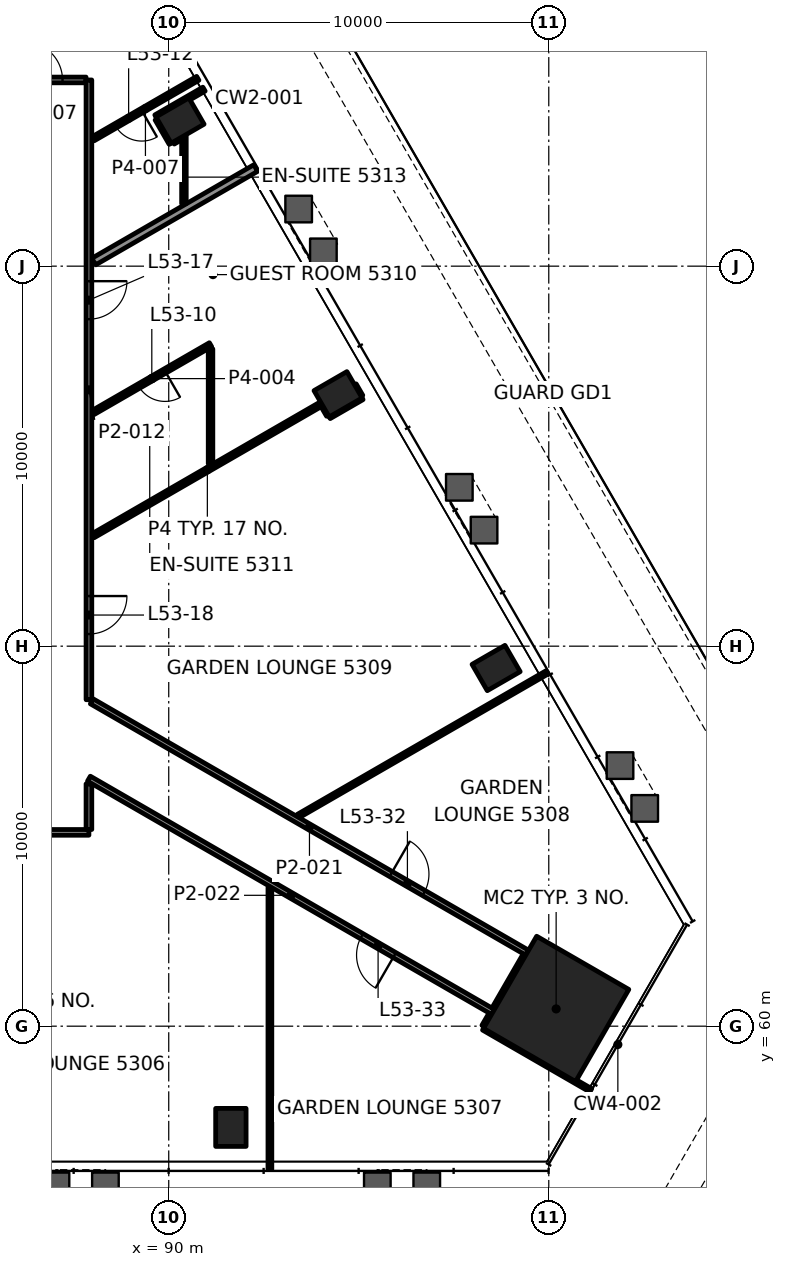
"""IFC4 building model, lengths in metres.
Left out: names, types, materials, properties, quantities, classifications, styles, units other than length and angle.
Written with IfcOpenShell. Run it as: python <this file> out.ifc"""

import sys

from ifc_helpers import new_model, si_unit, direction, frame, frame_2d, origin, origin_2d, place, context, subcontext, project, spatial, rectangle, hollow_rectangle, extrude, element, fill, save


model = new_model("IFC4")
c1 = context("Model", 3, precision=1e-05, world=origin(), true_north=direction((0.0, 1.0)))
c2 = subcontext(c1, "Body", "Model", "MODEL_VIEW")
j1 = project(units=[si_unit("LENGTHUNIT", "METRE"), si_unit("PLANEANGLEUNIT", "RADIAN")], contexts=[c1])
p1 = place(None, origin())
s1 = spatial("IfcSite", under=j1, at=p1, CompositionType="ELEMENT")
p2 = place(p1, origin())
s2 = spatial("IfcBuilding", under=s1, at=p2, CompositionType="ELEMENT")
p3 = place(p2, frame((0.0, 0.0, 226.0)))
s3 = spatial("IfcBuildingStorey", under=s2, at=p3, CompositionType="ELEMENT", Elevation=226.0)
p4 = place(p3, frame((100.194, 60.454, 0.0), z_axis=(0.0, 0.0, 1.0), x_axis=(0.5, 0.866025403784, 0.0)))
e1 = element("IfcColumn", 1, at=p4, inside=s3, PredefinedType="COLUMN", context=c2, shape_type="SweptSolid", body=[
    extrude(rectangle(XDim=2.8, YDim=2.8, at=origin_2d()), origin(), (0.0, 0.0, 1.0), 3.9),
])
for number, where, z_axis, x_axis in (
    (2, (91.635, 57.337, -0.0), (0.0, 0.0, 1.0), (1.0, 0.0, 0.0)),
    (3, (98.615, 69.425, -0.0), (0.0, 0.0, 1.0), (-0.5, 0.866, 0.0)),
    (4, (94.456, 76.628, -0.0), (0.0, 0.0, 1.0), (-0.5, 0.866, 0.0)),
    (5, (90.297, 83.832, -0.0), (0.0, 0.0, 1.0), (-0.5, 0.866, 0.0)),
):
    element("IfcColumn", number, at=place(p3, frame(where, z_axis=z_axis, x_axis=x_axis)), inside=s3, PredefinedType="COLUMN", context=c2, shape_type="SweptSolid", body=[
        extrude(hollow_rectangle(XDim=0.8, YDim=1.0, WallThickness=0.05, at=origin_2d()), origin(), (0.0, 0.0, 1.0), 3.9),
    ])
p5 = place(p3, frame((87.899, 65.1, 0.0), z_axis=(0.0, 0.0, 1.0), x_axis=(-1.0, 0.0, 0.0)))
e6 = element("IfcWall", 6, at=p5, inside=s3, PredefinedType="PARTITIONING", context=c2, shape_type="SweptSolid", body=[
    extrude(rectangle(XDim=25.799, YDim=0.15, at=frame_2d((12.899, 0.0))), origin(), (0.0, 0.0, 1.0), 3.1),
])
p6 = place(p5, frame((1.636, 0.0, 0.0)))
e7 = element("IfcOpeningElement", 7, at=p6, cuts=e6, PredefinedType="OPENING", context=c2, shape_type="SweptSolid", body=[
    extrude(rectangle(XDim=1.0, YDim=2.1, at=frame_2d((0.5, 1.05))), frame((0.0, 0.085, 0.0), z_axis=(0.0, -1.0, 0.0), x_axis=(1.0, 0.0, 0.0)), (0.0, 0.0, 1.0), 0.17),
])
p7 = place(p5, frame((7.984, 0.0, 0.0)))
e8 = element("IfcOpeningElement", 8, at=p7, cuts=e6, PredefinedType="OPENING", context=c2, shape_type="SweptSolid", body=[
    extrude(rectangle(XDim=1.0, YDim=2.1, at=frame_2d((0.5, 1.05))), frame((0.0, 0.085, 0.0), z_axis=(0.0, -1.0, 0.0), x_axis=(1.0, 0.0, 0.0)), (0.0, 0.0, 1.0), 0.17),
])
p8 = place(p5, frame((16.815, 0.0, 0.0)))
e9 = element("IfcOpeningElement", 9, at=p8, cuts=e6, PredefinedType="OPENING", context=c2, shape_type="SweptSolid", body=[
    extrude(rectangle(XDim=1.0, YDim=2.1, at=frame_2d((0.5, 1.05))), frame((0.0, 0.085, 0.0), z_axis=(0.0, -1.0, 0.0), x_axis=(1.0, 0.0, 0.0)), (0.0, 0.0, 1.0), 0.17),
])
p9 = place(p5, frame((23.163, 0.0, 0.0)))
e10 = element("IfcOpeningElement", 10, at=p9, cuts=e6, PredefinedType="OPENING", context=c2, shape_type="SweptSolid", body=[
    extrude(rectangle(XDim=1.0, YDim=2.1, at=frame_2d((0.5, 1.05))), frame((0.0, 0.085, 0.0), z_axis=(0.0, -1.0, 0.0), x_axis=(1.0, 0.0, 0.0)), (0.0, 0.0, 1.0), 0.17),
])
p10 = place(p3, frame((78.215, 84.9, 0.0), z_axis=(0.0, 0.0, 1.0), x_axis=(1.0, 0.0, 0.0)))
e11 = element("IfcWall", 11, at=p10, inside=s3, PredefinedType="PARTITIONING", context=c2, shape_type="SweptSolid", body=[
    extrude(rectangle(XDim=9.609, YDim=0.15, at=frame_2d((4.805, 0.0))), origin(), (0.0, 0.0, 1.0), 3.097),
])
p11 = place(p10, frame((7.99, 0.0, 0.0)))
e12 = element("IfcOpeningElement", 12, at=p11, cuts=e11, PredefinedType="OPENING", context=c2, shape_type="SweptSolid", body=[
    extrude(rectangle(XDim=1.0, YDim=2.1, at=frame_2d((0.5, 1.05))), frame((0.0, 0.085, 0.0), z_axis=(0.0, -1.0, 0.0), x_axis=(1.0, 0.0, 0.0)), (0.0, 0.0, 1.0), 0.17),
])
p12 = place(p3, frame((93.406, 65.529, 0.0), z_axis=(0.0, 0.0, 1.0), x_axis=(0.866032295486, 0.499988063033, 0.0)))
e13 = element("IfcWall", 13, at=p12, inside=s3, PredefinedType="PARTITIONING", context=c2, shape_type="SweptSolid", body=[
    extrude(rectangle(XDim=7.559, YDim=0.1, at=frame_2d((3.779, 0.0))), origin(), (0.0, 0.0, 1.0), 3.1),
])
p13 = place(p3, frame((94.223, 76.032, 0.0), z_axis=(0.0, 0.0, 1.0), x_axis=(0.86597798544, 0.50008212199, 0.0)))
e14 = element("IfcWall", 14, at=p13, inside=s3, PredefinedType="PARTITIONING", context=c2, shape_type="SweptSolid", body=[
    extrude(rectangle(XDim=0.999, YDim=0.1, at=frame_2d((0.5, 0.0))), origin(), (0.0, 0.0, 1.0), 3.022),
])
p14 = place(p3, frame((88.01, 72.906, 0.0), z_axis=(0.0, 0.0, 1.0), x_axis=(0.866025136247, 0.500000463387, 0.0)))
e15 = element("IfcWall", 15, at=p14, inside=s3, PredefinedType="PARTITIONING", context=c2, shape_type="SweptSolid", body=[
    extrude(rectangle(XDim=6.943, YDim=0.12, at=frame_2d((3.471, 0.0))), origin(), (0.0, 0.0, 1.0), 3.1),
])
p15 = place(p3, frame((91.1, 77.933, 0.0), z_axis=(0.0, 0.0, 1.0), x_axis=(-0.866045460162, -0.499965259726, 0.0)))
e16 = element("IfcWall", 16, at=p15, inside=s3, PredefinedType="PARTITIONING", context=c2, shape_type="SweptSolid", body=[
    extrude(rectangle(XDim=3.569, YDim=0.12, at=frame_2d((1.784, 0.0))), origin(), (0.0, 0.0, 1.0), 3.1),
])
p16 = place(p15, frame((1.384, 0.0, 0.0)))
e17 = element("IfcOpeningElement", 17, at=p16, cuts=e16, PredefinedType="OPENING", context=c2, shape_type="SweptSolid", body=[
    extrude(rectangle(XDim=0.8, YDim=2.1, at=frame_2d((0.4, 1.05))), frame((0.0, 0.07, 0.0), z_axis=(0.0, -1.0, 0.0), x_axis=(1.0, 0.0, 0.0)), (0.0, 0.0, 1.0), 0.14),
])
p17 = place(p3, frame((88.027, 80.12, 0.0), z_axis=(0.0, 0.0, 1.0), x_axis=(0.866024509183, 0.500001549491, 0.0)))
e18 = element("IfcWall", 18, at=p17, inside=s3, PredefinedType="PARTITIONING", context=c2, shape_type="SweptSolid", body=[
    extrude(rectangle(XDim=4.922, YDim=0.2, at=frame_2d((2.461, 0.0))), origin(), (0.0, 0.0, 1.0), 3.022),
])
p18 = place(p3, frame((90.116, 83.265, 0.0), z_axis=(0.0, 0.0, 1.0), x_axis=(0.866036909293, 0.499980071345, 0.0)))
e19 = element("IfcWall", 19, at=p18, inside=s3, PredefinedType="PARTITIONING", context=c2, shape_type="SweptSolid", body=[
    extrude(rectangle(XDim=0.219, YDim=0.12, at=frame_2d((0.109, 0.0))), origin(), (0.0, 0.0, 1.0), 3.1),
])
p19 = place(p3, frame((89.664, 83.928, 0.0), z_axis=(0.0, 0.0, 1.0), x_axis=(0.866032430508, 0.49998782916, 0.0)))
e20 = element("IfcWall", 20, at=p19, inside=s3, PredefinedType="PARTITIONING", context=c2, shape_type="SweptSolid", body=[
    extrude(rectangle(XDim=1.46, YDim=0.12, at=frame_2d((0.73, 0.0))), origin(), (0.0, 0.0, 1.0), 3.022),
])
p20 = place(p3, frame((90.764, 84.942, 0.0), z_axis=(0.0, 0.0, 1.0), x_axis=(-0.866052668871, -0.499952772512, 0.0)))
e21 = element("IfcWall", 21, at=p20, inside=s3, PredefinedType="PARTITIONING", context=c2, shape_type="SweptSolid", body=[
    extrude(rectangle(XDim=3.181, YDim=0.12, at=frame_2d((1.59, 0.0))), origin(), (0.0, 0.0, 1.0), 3.022),
])
p21 = place(p20, frame((1.701, 0.0, 0.0)))
e22 = element("IfcOpeningElement", 22, at=p21, cuts=e21, PredefinedType="OPENING", context=c2, shape_type="SweptSolid", body=[
    extrude(rectangle(XDim=0.8, YDim=2.1, at=frame_2d((0.4, 1.05))), frame((0.0, 0.07, 0.0), z_axis=(0.0, -1.0, 0.0), x_axis=(1.0, 0.0, 0.0)), (0.0, 0.0, 1.0), 0.14),
])
p22 = place(p3, frame((84.115, 85.065, 0.0), z_axis=(0.0, 0.0, 1.0), x_axis=(0.866027152591, 0.499996970966, 0.0)))
e23 = element("IfcWall", 23, at=p22, inside=s3, PredefinedType="PARTITIONING", context=c2, shape_type="SweptSolid", body=[
    extrude(rectangle(XDim=5.697, YDim=0.2, at=frame_2d((2.848, 0.0))), origin(), (0.0, 0.0, 1.0), 3.022),
])
p23 = place(p3, frame((98.306, 59.986, 0.0), z_axis=(0.0, 0.0, 1.0), x_axis=(0.500136362069, 0.865946660792, 0.0)))
e24 = element("IfcWall", 24, at=p23, inside=s3, PredefinedType="PARTITIONING", context=c2, shape_type="SweptSolid", body=[
    extrude(rectangle(XDim=0.375, YDim=0.15, at=frame_2d((0.187, 0.0))), origin(), (0.0, 0.0, 1.0), 3.1),
])
p24 = place(p3, frame((92.662, 56.237, 0.0), z_axis=(0.0, 0.0, 1.0), x_axis=(0.0, 1.0, 0.0)))
e25 = element("IfcWall", 25, at=p24, inside=s3, PredefinedType="PARTITIONING", context=c2, shape_type="SweptSolid", body=[
    extrude(rectangle(XDim=7.41, YDim=0.1, at=frame_2d((3.705, 0.0))), origin(), (0.0, 0.0, 1.0), 3.1),
])
p25 = place(p3, frame((91.1, 74.8, 0.0), z_axis=(0.0, 0.0, 1.0), x_axis=(0.0, 1.0, 0.0)))
e26 = element("IfcWall", 26, at=p25, inside=s3, PredefinedType="PARTITIONING", context=c2, shape_type="SweptSolid", body=[
    extrude(rectangle(XDim=3.023, YDim=0.12, at=frame_2d((1.511, 0.0))), origin(), (0.0, 0.0, 1.0), 3.1),
])
p26 = place(p3, frame((90.4, 81.646, 0.0), z_axis=(0.0, 0.0, 1.0), x_axis=(0.0, 1.0, 0.0)))
e27 = element("IfcWall", 27, at=p26, inside=s3, PredefinedType="PARTITIONING", context=c2, shape_type="SweptSolid", body=[
    extrude(rectangle(XDim=1.784, YDim=0.12, at=frame_2d((0.892, 0.0))), origin(), (0.0, 0.0, 1.0), 3.022),
])
p27 = place(p3, frame((87.9, 65.176, 0.0), z_axis=(0.0, 0.0, 1.0), x_axis=(0.0, 1.0, 0.0)))
e28 = element("IfcWall", 28, at=p27, inside=s3, PredefinedType="PARTITIONING", context=c2, shape_type="SweptSolid", body=[
    extrude(rectangle(XDim=1.201, YDim=0.15, at=frame_2d((0.6, 0.0))), origin(), (0.0, 0.0, 1.0), 2.947),
])
p28 = place(p3, frame((87.9, 84.899, 0.0), z_axis=(0.0, 0.0, 1.0), x_axis=(0.0, -1.0, 0.0)))
e29 = element("IfcWall", 29, at=p28, inside=s3, PredefinedType="PARTITIONING", context=c2, shape_type="SweptSolid", body=[
    extrude(rectangle(XDim=16.308, YDim=0.15, at=frame_2d((8.154, 0.0))), origin(), (0.0, 0.0, 1.0), 3.1),
])
p29 = place(p28, frame((5.294, 0.0, 0.0)))
e30 = element("IfcOpeningElement", 30, at=p29, cuts=e29, PredefinedType="OPENING", context=c2, shape_type="SweptSolid", body=[
    extrude(rectangle(XDim=1.0, YDim=2.1, at=frame_2d((0.5, 1.05))), frame((0.0, 0.085, 0.0), z_axis=(0.0, -1.0, 0.0), x_axis=(1.0, 0.0, 0.0)), (0.0, 0.0, 1.0), 0.17),
])
p30 = place(p28, frame((13.58, 0.0, 0.0)))
e31 = element("IfcOpeningElement", 31, at=p30, cuts=e29, PredefinedType="OPENING", context=c2, shape_type="SweptSolid", body=[
    extrude(rectangle(XDim=1.0, YDim=2.1, at=frame_2d((0.5, 1.05))), frame((0.0, 0.085, 0.0), z_axis=(0.0, -1.0, 0.0), x_axis=(1.0, 0.0, 0.0)), (0.0, 0.0, 1.0), 0.17),
])
p31 = place(p3, frame((95.063, 76.576, 0.0), z_axis=(0.0, 0.0, 1.0), x_axis=(-0.500126092966, 0.865952591736, 0.0)))
e32 = element("IfcWall", 32, at=p31, inside=s3, PredefinedType="PARTITIONING", context=c2, shape_type="SweptSolid", body=[
    extrude(rectangle(XDim=0.349, YDim=0.1, at=frame_2d((0.175, 0.0))), origin(), (0.0, 0.0, 1.0), 3.1),
])
p32 = place(p3, frame((94.197, 76.076, 0.0), z_axis=(0.0, 0.0, 1.0), x_axis=(-0.500136839105, 0.865946385275, 0.0)))
e33 = element("IfcWall", 33, at=p32, inside=s3, PredefinedType="PARTITIONING", context=c2, shape_type="SweptSolid", body=[
    extrude(rectangle(XDim=0.289, YDim=0.1, at=frame_2d((0.145, 0.0))), origin(), (0.0, 0.0, 1.0), 3.1),
])
p33 = place(p3, frame((90.064, 83.235, 0.0), z_axis=(0.0, 0.0, 1.0), x_axis=(-0.500112705049, 0.865960323715, 0.0)))
e34 = element("IfcWall", 34, at=p33, inside=s3, PredefinedType="PARTITIONING", context=c2, shape_type="SweptSolid", body=[
    extrude(rectangle(XDim=0.74, YDim=0.12, at=frame_2d((0.37, 0.0))), origin(), (0.0, 0.0, 1.0), 3.1),
])
p34 = place(p3, frame((87.975, 68.548, 0.0), z_axis=(0.0, 0.0, 1.0), x_axis=(0.866030071145, -0.499991915808, 0.0)))
e35 = element("IfcWall", 35, at=p34, inside=s3, PredefinedType="PARTITIONING", context=c2, shape_type="SweptSolid", body=[
    extrude(rectangle(XDim=13.228, YDim=0.15, at=frame_2d((6.614, 0.0))), origin(), (0.0, 0.0, 1.0), 3.1),
])
p35 = place(p34, frame((9.09, 0.0, 0.0)))
e36 = element("IfcOpeningElement", 36, at=p35, cuts=e35, PredefinedType="OPENING", context=c2, shape_type="SweptSolid", body=[
    extrude(rectangle(XDim=1.0, YDim=2.1, at=frame_2d((0.5, 1.05))), frame((0.0, 0.085, 0.0), z_axis=(0.0, -1.0, 0.0), x_axis=(1.0, 0.0, 0.0)), (0.0, 0.0, 1.0), 0.17),
])
p36 = place(p3, frame((98.531, 60.375, 0.0), z_axis=(0.0, 0.0, 1.0), x_axis=(-0.866027942666, 0.499995602502, 0.0)))
e37 = element("IfcWall", 37, at=p36, inside=s3, PredefinedType="PARTITIONING", context=c2, shape_type="SweptSolid", body=[
    extrude(rectangle(XDim=12.276, YDim=0.15, at=frame_2d((6.138, 0.0))), origin(), (0.0, 0.0, 1.0), 2.947),
])
p37 = place(p36, frame((2.99, 0.0, 0.0)))
e38 = element("IfcOpeningElement", 38, at=p37, cuts=e37, PredefinedType="OPENING", context=c2, shape_type="SweptSolid", body=[
    extrude(rectangle(XDim=1.0, YDim=2.1, at=frame_2d((0.5, 1.05))), frame((0.0, 0.085, 0.0), z_axis=(0.0, -1.0, 0.0), x_axis=(1.0, 0.0, 0.0)), (0.0, 0.0, 1.0), 0.17),
])
p38 = place(p3, frame((101.105, 58.312, 0.0), z_axis=(0.0, 0.0, 1.0), x_axis=(-0.866035906198, 0.499981808845, 0.0)))
e39 = element("IfcWall", 39, at=p38, inside=s3, PredefinedType="PARTITIONING", context=c2, shape_type="SweptSolid", body=[
    extrude(rectangle(XDim=3.259, YDim=0.1, at=frame_2d((1.63, 0.0))), origin(), (0.0, 0.0, 1.0), 3.1),
])
p39 = place(p3, frame((98.569, 60.44, 0.0), z_axis=(0.0, 0.0, 1.0), x_axis=(0.500055614084, 0.865993292597, 0.0)))
e40 = element("IfcWall", 40, at=p39, inside=s3, PredefinedType="PARTITIONING", context=c2, shape_type="SweptSolid", body=[
    extrude(rectangle(XDim=1.649, YDim=0.15, at=frame_2d((0.825, 0.0))), origin(), (0.0, 0.0, 1.0), 2.947),
])
p40 = place(p3, frame((102.236, 53.491, 0.0), z_axis=(0.0, 0.0, 1.0), x_axis=(0.50001002959, 0.86601961312, 0.0)))
e41 = element("IfcWall", 41, at=p40, inside=s3, PredefinedType="SOLIDWALL", context=c2, shape_type="SweptSolid", body=[
    extrude(rectangle(XDim=10.019, YDim=0.8, at=frame_2d((5.009, 0.0))), origin(), (0.0, 0.0, 1.0), 0.9),
])
p41 = place(p3, frame((107.245, 63.176, 0.0), z_axis=(0.0, 0.0, 1.0), x_axis=(-0.500002275173, 0.866024090209, 0.0)))
e42 = element("IfcWall", 42, at=p41, inside=s3, PredefinedType="SOLIDWALL", context=c2, shape_type="SweptSolid", body=[
    extrude(rectangle(XDim=30.436, YDim=0.8, at=frame_2d((15.218, 0.0))), origin(), (0.0, 0.0, 1.0), 0.9),
])
p42 = place(p11, origin())
e43 = element("IfcDoor", 43, at=p42, inside=s3, OperationType="SINGLE_SWING_LEFT", PredefinedType="DOOR", context=c2, shape_type="SweptSolid", body=[
    extrude(rectangle(XDim=1.0, YDim=2.1, at=frame_2d((0.5, 1.05))), frame((0.0, 0.025, 0.0), z_axis=(0.0, -1.0, 0.0), x_axis=(1.0, 0.0, 0.0)), (0.0, 0.0, 1.0), 0.05),
])
fill(e12, e43)
p43 = place(p16, origin())
e44 = element("IfcDoor", 44, at=p43, inside=s3, OperationType="SINGLE_SWING_LEFT", PredefinedType="DOOR", context=c2, shape_type="SweptSolid", body=[
    extrude(rectangle(XDim=0.8, YDim=2.1, at=frame_2d((0.4, 1.05))), frame((0.0, 0.025, 0.0), z_axis=(0.0, -1.0, 0.0), x_axis=(1.0, 0.0, 0.0)), (0.0, 0.0, 1.0), 0.05),
])
fill(e17, e44)
p44 = place(p21, origin())
e45 = element("IfcDoor", 45, at=p44, inside=s3, OperationType="SINGLE_SWING_LEFT", PredefinedType="DOOR", context=c2, shape_type="SweptSolid", body=[
    extrude(rectangle(XDim=0.8, YDim=2.1, at=frame_2d((0.4, 1.05))), frame((0.0, 0.025, 0.0), z_axis=(0.0, -1.0, 0.0), x_axis=(1.0, 0.0, 0.0)), (0.0, 0.0, 1.0), 0.05),
])
fill(e22, e45)
p45 = place(p29, origin())
e46 = element("IfcDoor", 46, at=p45, inside=s3, OperationType="SINGLE_SWING_RIGHT", PredefinedType="DOOR", context=c2, shape_type="SweptSolid", body=[
    extrude(rectangle(XDim=1.0, YDim=2.1, at=frame_2d((0.5, 1.05))), frame((0.0, 0.025, 0.0), z_axis=(0.0, -1.0, 0.0), x_axis=(1.0, 0.0, 0.0)), (0.0, 0.0, 1.0), 0.05),
])
fill(e30, e46)
p46 = place(p30, origin())
e47 = element("IfcDoor", 47, at=p46, inside=s3, OperationType="SINGLE_SWING_LEFT", PredefinedType="DOOR", context=c2, shape_type="SweptSolid", body=[
    extrude(rectangle(XDim=1.0, YDim=2.1, at=frame_2d((0.5, 1.05))), frame((0.0, 0.025, 0.0), z_axis=(0.0, -1.0, 0.0), x_axis=(1.0, 0.0, 0.0)), (0.0, 0.0, 1.0), 0.05),
])
fill(e31, e47)
p47 = place(p35, origin())
e48 = element("IfcDoor", 48, at=p47, inside=s3, OperationType="SINGLE_SWING_RIGHT", PredefinedType="DOOR", context=c2, shape_type="SweptSolid", body=[
    extrude(rectangle(XDim=1.0, YDim=2.1, at=frame_2d((0.5, 1.05))), frame((0.0, 0.025, 0.0), z_axis=(0.0, -1.0, 0.0), x_axis=(1.0, 0.0, 0.0)), (0.0, 0.0, 1.0), 0.05),
])
fill(e36, e48)
p48 = place(p37, origin())
e49 = element("IfcDoor", 49, at=p48, inside=s3, OperationType="SINGLE_SWING_RIGHT", PredefinedType="DOOR", context=c2, shape_type="SweptSolid", body=[
    extrude(rectangle(XDim=1.0, YDim=2.1, at=frame_2d((0.5, 1.05))), frame((0.0, 0.025, 0.0), z_axis=(0.0, -1.0, 0.0), x_axis=(1.0, 0.0, 0.0)), (0.0, 0.0, 1.0), 0.05),
])
fill(e38, e49)
save(model, sys.argv[1])
